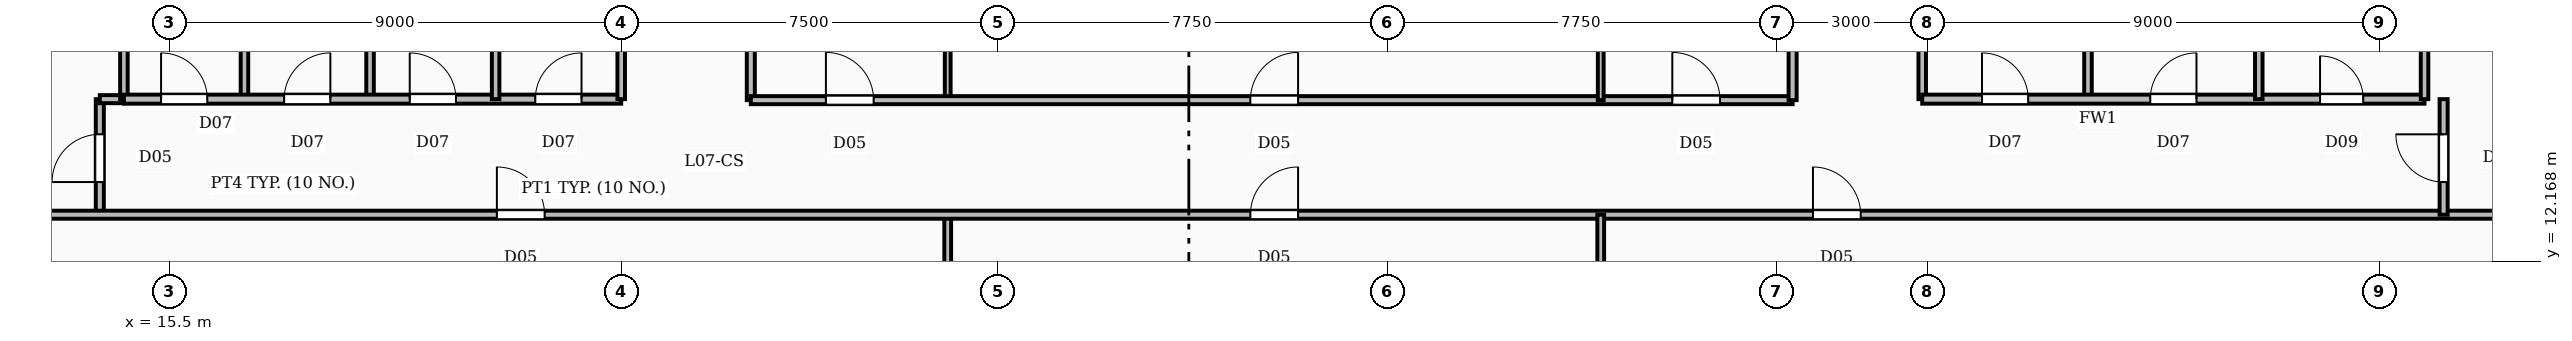
"""IFC4 building model, lengths in metres.
Left out: names, types, materials, properties, quantities, classifications, styles, units other than length and angle.
Written with IfcOpenShell. Run it as: python <this file> out.ifc"""

import sys

from ifc_helpers import new_model, si_unit, direction, frame, frame_2d, origin, place, context, subcontext, project, spatial, rectangle, extrude, element, fill, save


model = new_model("IFC4")
c1 = context("Model", 3, precision=1e-05, world=origin(), true_north=direction((0.0, 1.0)))
c2 = subcontext(c1, "Body", "Model", "MODEL_VIEW")
j1 = project(units=[si_unit("LENGTHUNIT", "METRE"), si_unit("PLANEANGLEUNIT", "RADIAN")], contexts=[c1])
p1 = place(None, origin())
s1 = spatial("IfcSite", under=j1, at=p1, CompositionType="ELEMENT")
p2 = place(p1, origin())
s2 = spatial("IfcBuilding", under=s1, at=p2, CompositionType="ELEMENT")
p3 = place(p2, frame((0.0, 0.0, 42.0)))
s3 = spatial("IfcBuildingStorey", under=s2, at=p3, CompositionType="ELEMENT", Elevation=42.0)
for number, where, z_axis, x_axis in (
    (1, (17.0, 15.4, 0.0), (0.0, 0.0, 1.0), (0.0, 1.0, 0.0)),
    (2, (19.5, 15.4, 0.0), (0.0, 0.0, 1.0), (0.0, 1.0, 0.0)),
    (3, (22.0, 15.4, 0.0), (0.0, 0.0, 1.0), (0.0, 1.0, 0.0)),
):
    element("IfcWall", number, at=place(p3, frame(where, z_axis=z_axis, x_axis=x_axis)), inside=s3, PredefinedType="PARTITIONING", context=c2, shape_type="SweptSolid", body=[
        extrude(rectangle(XDim=3.58, YDim=0.15, at=frame_2d((1.79, 0.0))), origin(), (0.0, 0.0, 1.0), 2.54),
    ])
p4 = place(p3, frame((14.6, 15.4, 0.0), z_axis=(0.0, 0.0, 1.0), x_axis=(1.0, 0.0, 0.0)))
e4 = element("IfcWall", 4, at=p4, inside=s3, PredefinedType="PARTITIONING", context=c2, shape_type="SweptSolid", body=[
    extrude(rectangle(XDim=9.9, YDim=0.18, at=frame_2d((4.95, 0.0))), origin(), (0.0, 0.0, 1.0), 2.54),
])
p5 = place(p4, frame((0.74, 0.0, 0.0)))
e5 = element("IfcOpeningElement", 5, at=p5, cuts=e4, PredefinedType="OPENING", context=c2, shape_type="SweptSolid", body=[
    extrude(rectangle(XDim=0.92, YDim=2.1, at=frame_2d((0.46, 1.05))), frame((0.0, 0.1, 0.0), z_axis=(0.0, -1.0, 0.0), x_axis=(1.0, 0.0, 0.0)), (0.0, 0.0, 1.0), 0.2),
])
p6 = place(p4, frame((3.19, 0.0, 0.0)))
e6 = element("IfcOpeningElement", 6, at=p6, cuts=e4, PredefinedType="OPENING", context=c2, shape_type="SweptSolid", body=[
    extrude(rectangle(XDim=0.92, YDim=2.1, at=frame_2d((0.46, 1.05))), frame((0.0, 0.1, 0.0), z_axis=(0.0, -1.0, 0.0), x_axis=(1.0, 0.0, 0.0)), (0.0, 0.0, 1.0), 0.2),
])
p7 = place(p4, frame((5.69, 0.0, 0.0)))
e7 = element("IfcOpeningElement", 7, at=p7, cuts=e4, PredefinedType="OPENING", context=c2, shape_type="SweptSolid", body=[
    extrude(rectangle(XDim=0.92, YDim=2.1, at=frame_2d((0.46, 1.05))), frame((0.0, 0.1, 0.0), z_axis=(0.0, -1.0, 0.0), x_axis=(1.0, 0.0, 0.0)), (0.0, 0.0, 1.0), 0.2),
])
p8 = place(p4, frame((8.19, 0.0, 0.0)))
e8 = element("IfcOpeningElement", 8, at=p8, cuts=e4, PredefinedType="OPENING", context=c2, shape_type="SweptSolid", body=[
    extrude(rectangle(XDim=0.92, YDim=2.1, at=frame_2d((0.46, 1.05))), frame((0.0, 0.1, 0.0), z_axis=(0.0, -1.0, 0.0), x_axis=(1.0, 0.0, 0.0)), (0.0, 0.0, 1.0), 0.2),
])
for number, where, z_axis, x_axis in (
    (9, (14.6, 15.4, 0.0), (0.0, 0.0, 1.0), (0.0, 1.0, 0.0)),
    (10, (24.5, 15.4, 0.0), (0.0, 0.0, 1.0), (0.0, 1.0, 0.0)),
    (11, (53.7, 15.4, 0.0), (0.0, 0.0, 1.0), (0.0, 1.0, 0.0)),
    (12, (57.1, 15.4, 0.0), (0.0, 0.0, 1.0), (0.0, 1.0, 0.0)),
):
    element("IfcWall", number, at=place(p3, frame(where, z_axis=z_axis, x_axis=x_axis)), inside=s3, PredefinedType="PARTITIONING", context=c2, shape_type="SweptSolid", body=[
        extrude(rectangle(XDim=3.58, YDim=0.15, at=frame_2d((1.79, 0.0))), origin(), (0.0, 0.0, 1.0), 2.54),
    ])
p9 = place(p3, frame((50.4, 15.4, 0.0), z_axis=(0.0, 0.0, 1.0), x_axis=(1.0, 0.0, 0.0)))
e13 = element("IfcWall", 13, at=p9, inside=s3, PredefinedType="SOLIDWALL", context=c2, shape_type="SweptSolid", body=[
    extrude(rectangle(XDim=10.0, YDim=0.18, at=frame_2d((5.0, 0.0))), origin(), (0.0, 0.0, 1.0), 2.54),
])
p10 = place(p9, frame((1.19, 0.0, 0.0)))
e14 = element("IfcOpeningElement", 14, at=p10, cuts=e13, PredefinedType="OPENING", context=c2, shape_type="SweptSolid", body=[
    extrude(rectangle(XDim=0.92, YDim=2.1, at=frame_2d((0.46, 1.05))), frame((0.0, 0.1, 0.0), z_axis=(0.0, -1.0, 0.0), x_axis=(1.0, 0.0, 0.0)), (0.0, 0.0, 1.0), 0.2),
])
p11 = place(p9, frame((4.54, 0.0, 0.0)))
e15 = element("IfcOpeningElement", 15, at=p11, cuts=e13, PredefinedType="OPENING", context=c2, shape_type="SweptSolid", body=[
    extrude(rectangle(XDim=0.92, YDim=2.1, at=frame_2d((0.46, 1.05))), frame((0.0, 0.1, 0.0), z_axis=(0.0, -1.0, 0.0), x_axis=(1.0, 0.0, 0.0)), (0.0, 0.0, 1.0), 0.2),
])
p12 = place(p9, frame((7.92, 0.0, 0.0)))
e16 = element("IfcOpeningElement", 16, at=p12, cuts=e13, PredefinedType="OPENING", context=c2, shape_type="SweptSolid", body=[
    extrude(rectangle(XDim=0.86, YDim=2.05, at=frame_2d((0.43, 1.025))), frame((0.0, 0.1, 0.0), z_axis=(0.0, -1.0, 0.0), x_axis=(1.0, 0.0, 0.0)), (0.0, 0.0, 1.0), 0.2),
])
for number, where, z_axis, x_axis in (
    (17, (50.4, 15.4, 0.0), (0.0, 0.0, 1.0), (0.0, 1.0, 0.0)),
    (18, (60.4, 15.4, 0.0), (0.0, 0.0, 1.0), (0.0, 1.0, 0.0)),
):
    element("IfcWall", number, at=place(p3, frame(where, z_axis=z_axis, x_axis=x_axis)), inside=s3, PredefinedType="PARTITIONING", context=c2, shape_type="SweptSolid", body=[
        extrude(rectangle(XDim=3.58, YDim=0.15, at=frame_2d((1.79, 0.0))), origin(), (0.0, 0.0, 1.0), 2.54),
    ])
for number, where, z_axis, x_axis in (
    (19, (31.0, 2.5, 0.0), (0.0, 0.0, 1.0), (0.0, 1.0, 0.0)),
    (20, (44.0, 2.5, 0.0), (0.0, 0.0, 1.0), (0.0, 1.0, 0.0)),
):
    element("IfcWall", number, at=place(p3, frame(where, z_axis=z_axis, x_axis=x_axis)), inside=s3, PredefinedType="PARTITIONING", context=c2, shape_type="SweptSolid", body=[
        extrude(rectangle(XDim=10.6, YDim=0.135, at=frame_2d((5.3, 0.0))), origin(), (0.0, 0.0, 1.0), 2.54),
    ])
p13 = place(p3, frame((0.75, 13.1, 0.0), z_axis=(0.0, 0.0, 1.0), x_axis=(1.0, 0.0, 0.0)))
e21 = element("IfcWall", 21, at=p13, inside=s3, PredefinedType="PARTITIONING", context=c2, shape_type="SweptSolid", body=[
    extrude(rectangle(XDim=72.5, YDim=0.16, at=frame_2d((36.25, 0.0))), origin(), (0.0, 0.0, 1.0), 2.54),
])
p14 = place(p13, frame((21.275, 0.0, 0.0)))
e22 = element("IfcOpeningElement", 22, at=p14, cuts=e21, PredefinedType="OPENING", context=c2, shape_type="SweptSolid", body=[
    extrude(rectangle(XDim=0.95, YDim=2.15, at=frame_2d((0.475, 1.075))), frame((0.0, 0.09, 0.0), z_axis=(0.0, -1.0, 0.0), x_axis=(1.0, 0.0, 0.0)), (0.0, 0.0, 1.0), 0.18),
])
p15 = place(p13, frame((36.275, 0.0, 0.0)))
e23 = element("IfcOpeningElement", 23, at=p15, cuts=e21, PredefinedType="OPENING", context=c2, shape_type="SweptSolid", body=[
    extrude(rectangle(XDim=0.95, YDim=2.15, at=frame_2d((0.475, 1.075))), frame((0.0, 0.09, 0.0), z_axis=(0.0, -1.0, 0.0), x_axis=(1.0, 0.0, 0.0)), (0.0, 0.0, 1.0), 0.18),
])
p16 = place(p13, frame((47.475, 0.0, 0.0)))
e24 = element("IfcOpeningElement", 24, at=p16, cuts=e21, PredefinedType="OPENING", context=c2, shape_type="SweptSolid", body=[
    extrude(rectangle(XDim=0.95, YDim=2.15, at=frame_2d((0.475, 1.075))), frame((0.0, 0.09, 0.0), z_axis=(0.0, -1.0, 0.0), x_axis=(1.0, 0.0, 0.0)), (0.0, 0.0, 1.0), 0.18),
])
for number, where, z_axis, x_axis in (
    (25, (31.0, 15.38, 0.0), (0.0, 0.0, 1.0), (0.0, 1.0, 0.0)),
    (26, (44.0, 15.38, 0.0), (0.0, 0.0, 1.0), (0.0, 1.0, 0.0)),
):
    element("IfcWall", number, at=place(p3, frame(where, z_axis=z_axis, x_axis=x_axis)), inside=s3, PredefinedType="PARTITIONING", context=c2, shape_type="SweptSolid", body=[
        extrude(rectangle(XDim=19.0, YDim=0.115, at=frame_2d((9.5, 0.0))), origin(), (0.0, 0.0, 1.0), 2.54),
    ])
p17 = place(p3, frame((27.08, 15.38, 0.0), z_axis=(0.0, 0.0, 1.0), x_axis=(1.0, 0.0, 0.0)))
e27 = element("IfcWall", 27, at=p17, inside=s3, PredefinedType="PARTITIONING", context=c2, shape_type="SweptSolid", body=[
    extrude(rectangle(XDim=20.74, YDim=0.16, at=frame_2d((10.37, 0.0))), origin(), (0.0, 0.0, 1.0), 2.54),
])
p18 = place(p17, frame((1.495, 0.0, 0.0)))
e28 = element("IfcOpeningElement", 28, at=p18, cuts=e27, PredefinedType="OPENING", context=c2, shape_type="SweptSolid", body=[
    extrude(rectangle(XDim=0.95, YDim=2.15, at=frame_2d((0.475, 1.075))), frame((0.0, 0.09, 0.0), z_axis=(0.0, -1.0, 0.0), x_axis=(1.0, 0.0, 0.0)), (0.0, 0.0, 1.0), 0.18),
])
p19 = place(p17, frame((9.945, 0.0, 0.0)))
e29 = element("IfcOpeningElement", 29, at=p19, cuts=e27, PredefinedType="OPENING", context=c2, shape_type="SweptSolid", body=[
    extrude(rectangle(XDim=0.95, YDim=2.15, at=frame_2d((0.475, 1.075))), frame((0.0, 0.09, 0.0), z_axis=(0.0, -1.0, 0.0), x_axis=(1.0, 0.0, 0.0)), (0.0, 0.0, 1.0), 0.18),
])
p20 = place(p17, frame((18.345, 0.0, 0.0)))
e30 = element("IfcOpeningElement", 30, at=p20, cuts=e27, PredefinedType="OPENING", context=c2, shape_type="SweptSolid", body=[
    extrude(rectangle(XDim=0.95, YDim=2.15, at=frame_2d((0.475, 1.075))), frame((0.0, 0.09, 0.0), z_axis=(0.0, -1.0, 0.0), x_axis=(1.0, 0.0, 0.0)), (0.0, 0.0, 1.0), 0.18),
])
for number, where, z_axis, x_axis in (
    (31, (27.08, 15.38, 0.0), (0.0, 0.0, 1.0), (0.0, 1.0, 0.0)),
    (32, (47.82, 15.38, 0.0), (0.0, 0.0, 1.0), (0.0, 1.0, 0.0)),
):
    element("IfcWall", number, at=place(p3, frame(where, z_axis=z_axis, x_axis=x_axis)), inside=s3, PredefinedType="PARTITIONING", context=c2, shape_type="SweptSolid", body=[
        extrude(rectangle(XDim=19.0, YDim=0.16, at=frame_2d((9.5, 0.0))), origin(), (0.0, 0.0, 1.0), 2.54),
    ])
p21 = place(p3, frame((14.12, 13.1, 0.0), z_axis=(0.0, 0.0, 1.0), x_axis=(0.0, 1.0, 0.0)))
e33 = element("IfcWall", 33, at=p21, inside=s3, PredefinedType="PARTITIONING", context=c2, shape_type="SweptSolid", body=[
    extrude(rectangle(XDim=2.3, YDim=0.16, at=frame_2d((1.15, 0.0))), origin(), (0.0, 0.0, 1.0), 2.54),
])
p22 = place(p21, frame((0.65, 0.0, 0.0)))
e34 = element("IfcOpeningElement", 34, at=p22, cuts=e33, PredefinedType="OPENING", context=c2, shape_type="SweptSolid", body=[
    extrude(rectangle(XDim=0.95, YDim=2.15, at=frame_2d((0.475, 1.075))), frame((0.0, 0.09, 0.0), z_axis=(0.0, -1.0, 0.0), x_axis=(1.0, 0.0, 0.0)), (0.0, 0.0, 1.0), 0.18),
])
p23 = place(p3, frame((14.12, 15.4, 0.0), z_axis=(0.0, 0.0, 1.0), x_axis=(1.0, 0.0, 0.0)))
e35 = element("IfcWall", 35, at=p23, inside=s3, PredefinedType="PARTITIONING", context=c2, shape_type="SweptSolid", body=[
    extrude(rectangle(XDim=0.5, YDim=0.16, at=frame_2d((0.25, 0.0))), origin(), (0.0, 0.0, 1.0), 2.54),
])
p24 = place(p3, frame((60.78, 13.1, 0.0), z_axis=(0.0, 0.0, 1.0), x_axis=(0.0, 1.0, 0.0)))
e36 = element("IfcWall", 36, at=p24, inside=s3, PredefinedType="PARTITIONING", context=c2, shape_type="SweptSolid", body=[
    extrude(rectangle(XDim=2.3, YDim=0.16, at=frame_2d((1.15, 0.0))), origin(), (0.0, 0.0, 1.0), 2.54),
])
p25 = place(p24, frame((0.65, 0.0, 0.0)))
e37 = element("IfcOpeningElement", 37, at=p25, cuts=e36, PredefinedType="OPENING", context=c2, shape_type="SweptSolid", body=[
    extrude(rectangle(XDim=0.95, YDim=2.15, at=frame_2d((0.475, 1.075))), frame((0.0, 0.09, 0.0), z_axis=(0.0, -1.0, 0.0), x_axis=(1.0, 0.0, 0.0)), (0.0, 0.0, 1.0), 0.18),
])
p26 = place(p5, origin())
e38 = element("IfcDoor", 38, at=p26, inside=s3, OperationType="SINGLE_SWING_LEFT", PredefinedType="DOOR", context=c2, shape_type="SweptSolid", body=[
    extrude(rectangle(XDim=0.92, YDim=2.1, at=frame_2d((0.46, 1.05))), frame((0.0, 0.025, 0.0), z_axis=(0.0, -1.0, 0.0), x_axis=(1.0, 0.0, 0.0)), (0.0, 0.0, 1.0), 0.05),
])
fill(e5, e38)
p27 = place(p6, origin())
e39 = element("IfcDoor", 39, at=p27, inside=s3, OperationType="SINGLE_SWING_RIGHT", PredefinedType="DOOR", context=c2, shape_type="SweptSolid", body=[
    extrude(rectangle(XDim=0.92, YDim=2.1, at=frame_2d((0.46, 1.05))), frame((0.0, 0.025, 0.0), z_axis=(0.0, -1.0, 0.0), x_axis=(1.0, 0.0, 0.0)), (0.0, 0.0, 1.0), 0.05),
])
fill(e6, e39)
p28 = place(p7, origin())
e40 = element("IfcDoor", 40, at=p28, inside=s3, OperationType="SINGLE_SWING_LEFT", PredefinedType="DOOR", context=c2, shape_type="SweptSolid", body=[
    extrude(rectangle(XDim=0.92, YDim=2.1, at=frame_2d((0.46, 1.05))), frame((0.0, 0.025, 0.0), z_axis=(0.0, -1.0, 0.0), x_axis=(1.0, 0.0, 0.0)), (0.0, 0.0, 1.0), 0.05),
])
fill(e7, e40)
p29 = place(p8, origin())
e41 = element("IfcDoor", 41, at=p29, inside=s3, OperationType="SINGLE_SWING_RIGHT", PredefinedType="DOOR", context=c2, shape_type="SweptSolid", body=[
    extrude(rectangle(XDim=0.92, YDim=2.1, at=frame_2d((0.46, 1.05))), frame((0.0, 0.025, 0.0), z_axis=(0.0, -1.0, 0.0), x_axis=(1.0, 0.0, 0.0)), (0.0, 0.0, 1.0), 0.05),
])
fill(e8, e41)
p30 = place(p10, origin())
e42 = element("IfcDoor", 42, at=p30, inside=s3, OperationType="SINGLE_SWING_LEFT", PredefinedType="DOOR", context=c2, shape_type="SweptSolid", body=[
    extrude(rectangle(XDim=0.92, YDim=2.1, at=frame_2d((0.46, 1.05))), frame((0.0, 0.025, 0.0), z_axis=(0.0, -1.0, 0.0), x_axis=(1.0, 0.0, 0.0)), (0.0, 0.0, 1.0), 0.05),
])
fill(e14, e42)
p31 = place(p11, origin())
e43 = element("IfcDoor", 43, at=p31, inside=s3, OperationType="SINGLE_SWING_RIGHT", PredefinedType="DOOR", context=c2, shape_type="SweptSolid", body=[
    extrude(rectangle(XDim=0.92, YDim=2.1, at=frame_2d((0.46, 1.05))), frame((0.0, 0.025, 0.0), z_axis=(0.0, -1.0, 0.0), x_axis=(1.0, 0.0, 0.0)), (0.0, 0.0, 1.0), 0.05),
])
fill(e15, e43)
p32 = place(p12, origin())
e44 = element("IfcDoor", 44, at=p32, inside=s3, OperationType="SINGLE_SWING_LEFT", PredefinedType="DOOR", context=c2, shape_type="SweptSolid", body=[
    extrude(rectangle(XDim=0.86, YDim=2.05, at=frame_2d((0.43, 1.025))), frame((0.0, 0.025, 0.0), z_axis=(0.0, -1.0, 0.0), x_axis=(1.0, 0.0, 0.0)), (0.0, 0.0, 1.0), 0.05),
])
fill(e16, e44)
p33 = place(p14, origin())
e45 = element("IfcDoor", 45, at=p33, inside=s3, OperationType="SINGLE_SWING_LEFT", PredefinedType="DOOR", context=c2, shape_type="SweptSolid", body=[
    extrude(rectangle(XDim=0.95, YDim=2.15, at=frame_2d((0.475, 1.075))), frame((0.0, 0.025, 0.0), z_axis=(0.0, -1.0, 0.0), x_axis=(1.0, 0.0, 0.0)), (0.0, 0.0, 1.0), 0.05),
])
fill(e22, e45)
p34 = place(p15, origin())
e46 = element("IfcDoor", 46, at=p34, inside=s3, OperationType="SINGLE_SWING_RIGHT", PredefinedType="DOOR", context=c2, shape_type="SweptSolid", body=[
    extrude(rectangle(XDim=0.95, YDim=2.15, at=frame_2d((0.475, 1.075))), frame((0.0, 0.025, 0.0), z_axis=(0.0, -1.0, 0.0), x_axis=(1.0, 0.0, 0.0)), (0.0, 0.0, 1.0), 0.05),
])
fill(e23, e46)
p35 = place(p16, origin())
e47 = element("IfcDoor", 47, at=p35, inside=s3, OperationType="SINGLE_SWING_LEFT", PredefinedType="DOOR", context=c2, shape_type="SweptSolid", body=[
    extrude(rectangle(XDim=0.95, YDim=2.15, at=frame_2d((0.475, 1.075))), frame((0.0, 0.025, 0.0), z_axis=(0.0, -1.0, 0.0), x_axis=(1.0, 0.0, 0.0)), (0.0, 0.0, 1.0), 0.05),
])
fill(e24, e47)
p36 = place(p18, origin())
e48 = element("IfcDoor", 48, at=p36, inside=s3, OperationType="SINGLE_SWING_LEFT", PredefinedType="DOOR", context=c2, shape_type="SweptSolid", body=[
    extrude(rectangle(XDim=0.95, YDim=2.15, at=frame_2d((0.475, 1.075))), frame((0.0, 0.025, 0.0), z_axis=(0.0, -1.0, 0.0), x_axis=(1.0, 0.0, 0.0)), (0.0, 0.0, 1.0), 0.05),
])
fill(e28, e48)
p37 = place(p19, origin())
e49 = element("IfcDoor", 49, at=p37, inside=s3, OperationType="SINGLE_SWING_RIGHT", PredefinedType="DOOR", context=c2, shape_type="SweptSolid", body=[
    extrude(rectangle(XDim=0.95, YDim=2.15, at=frame_2d((0.475, 1.075))), frame((0.0, 0.025, 0.0), z_axis=(0.0, -1.0, 0.0), x_axis=(1.0, 0.0, 0.0)), (0.0, 0.0, 1.0), 0.05),
])
fill(e29, e49)
p38 = place(p20, origin())
e50 = element("IfcDoor", 50, at=p38, inside=s3, OperationType="SINGLE_SWING_LEFT", PredefinedType="DOOR", context=c2, shape_type="SweptSolid", body=[
    extrude(rectangle(XDim=0.95, YDim=2.15, at=frame_2d((0.475, 1.075))), frame((0.0, 0.025, 0.0), z_axis=(0.0, -1.0, 0.0), x_axis=(1.0, 0.0, 0.0)), (0.0, 0.0, 1.0), 0.05),
])
fill(e30, e50)
p39 = place(p22, origin())
e51 = element("IfcDoor", 51, at=p39, inside=s3, OperationType="SINGLE_SWING_LEFT", PredefinedType="DOOR", context=c2, shape_type="SweptSolid", body=[
    extrude(rectangle(XDim=0.95, YDim=2.15, at=frame_2d((0.475, 1.075))), frame((0.0, 0.025, 0.0), z_axis=(0.0, -1.0, 0.0), x_axis=(1.0, 0.0, 0.0)), (0.0, 0.0, 1.0), 0.05),
])
fill(e34, e51)
p40 = place(p25, origin())
e52 = element("IfcDoor", 52, at=p40, inside=s3, OperationType="SINGLE_SWING_RIGHT", PredefinedType="DOOR", context=c2, shape_type="SweptSolid", body=[
    extrude(rectangle(XDim=0.95, YDim=2.15, at=frame_2d((0.475, 1.075))), frame((0.0, 0.025, 0.0), z_axis=(0.0, -1.0, 0.0), x_axis=(1.0, 0.0, 0.0)), (0.0, 0.0, 1.0), 0.05),
])
fill(e37, e52)
save(model, sys.argv[1])
